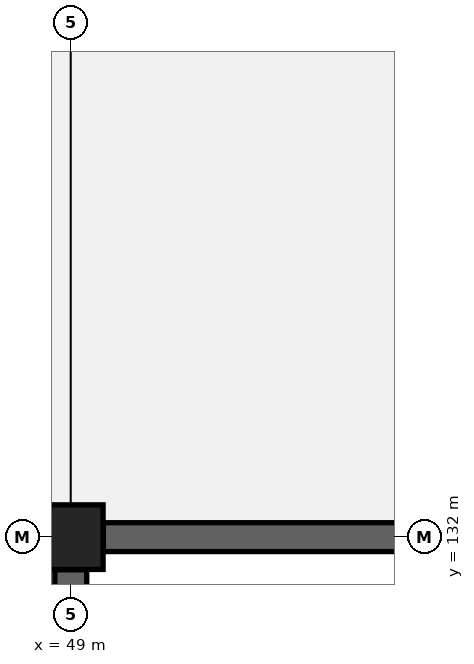
"""IFC4 building model, lengths in metres.
Left out: names, types, materials, properties, quantities, classifications, styles, units other than length and angle.
Written with IfcOpenShell. Run it as: python <this file> out.ifc"""

import sys

from ifc_helpers import new_model, si_unit, direction, frame, frame_2d, origin, origin_2d, place, context, subcontext, project, spatial, rectangle, circle, extrude, element, save


model = new_model("IFC4")
c1 = context("Model", 3, precision=1e-05, world=origin(), true_north=direction((0.0, 1.0)))
c2 = subcontext(c1, "Body", "Model", "MODEL_VIEW")
j1 = project(units=[si_unit("LENGTHUNIT", "METRE"), si_unit("PLANEANGLEUNIT", "RADIAN")], contexts=[c1])
p1 = place(None, origin())
s1 = spatial("IfcSite", under=j1, at=p1, CompositionType="ELEMENT")
p2 = place(p1, origin())
s2 = spatial("IfcBuilding", under=s1, at=p2, CompositionType="ELEMENT")
p3 = place(p2, frame((0.0, 0.0, -4.8)))
s3 = spatial("IfcBuildingStorey", under=s2, at=p3, CompositionType="ELEMENT", Elevation=-4.8)
p4 = place(p3, frame((49.0, 132.0, 0.0), z_axis=(0.0, 0.0, 1.0), x_axis=(1.0, 0.0, 0.0)))
e1 = element("IfcColumn", 1, at=p4, inside=s3, PredefinedType="COLUMN", context=c2, shape_type="SweptSolid", body=[
    extrude(circle(Radius=0.425, at=origin_2d()), origin(), (0.0, 0.0, 1.0), 4.8),
])
p5 = place(p3, frame((49.0, 120.504, 0.0), z_axis=(0.0, 0.0, 1.0), x_axis=(0.0, 1.0, 0.0)))
e2 = element("IfcWall", 2, at=p5, inside=s3, PredefinedType="STANDARD", context=c2, shape_type="SweptSolid", body=[
    extrude(rectangle(XDim=11.067, YDim=0.42, at=frame_2d((5.534, 0.0))), origin(), (0.0, 0.0, 1.0), 4.46),
])
p6 = place(p3, frame((49.429, 132.0, 0.0), z_axis=(0.0, 0.0, 1.0), x_axis=(1.0, 0.0, 0.0)))
e3 = element("IfcWall", 3, at=p6, inside=s3, PredefinedType="STANDARD", context=c2, shape_type="SweptSolid", body=[
    extrude(rectangle(XDim=11.567, YDim=0.38, at=frame_2d((5.784, 0.0))), origin(), (0.0, 0.0, 1.0), 4.46),
])
save(model, sys.argv[1])
